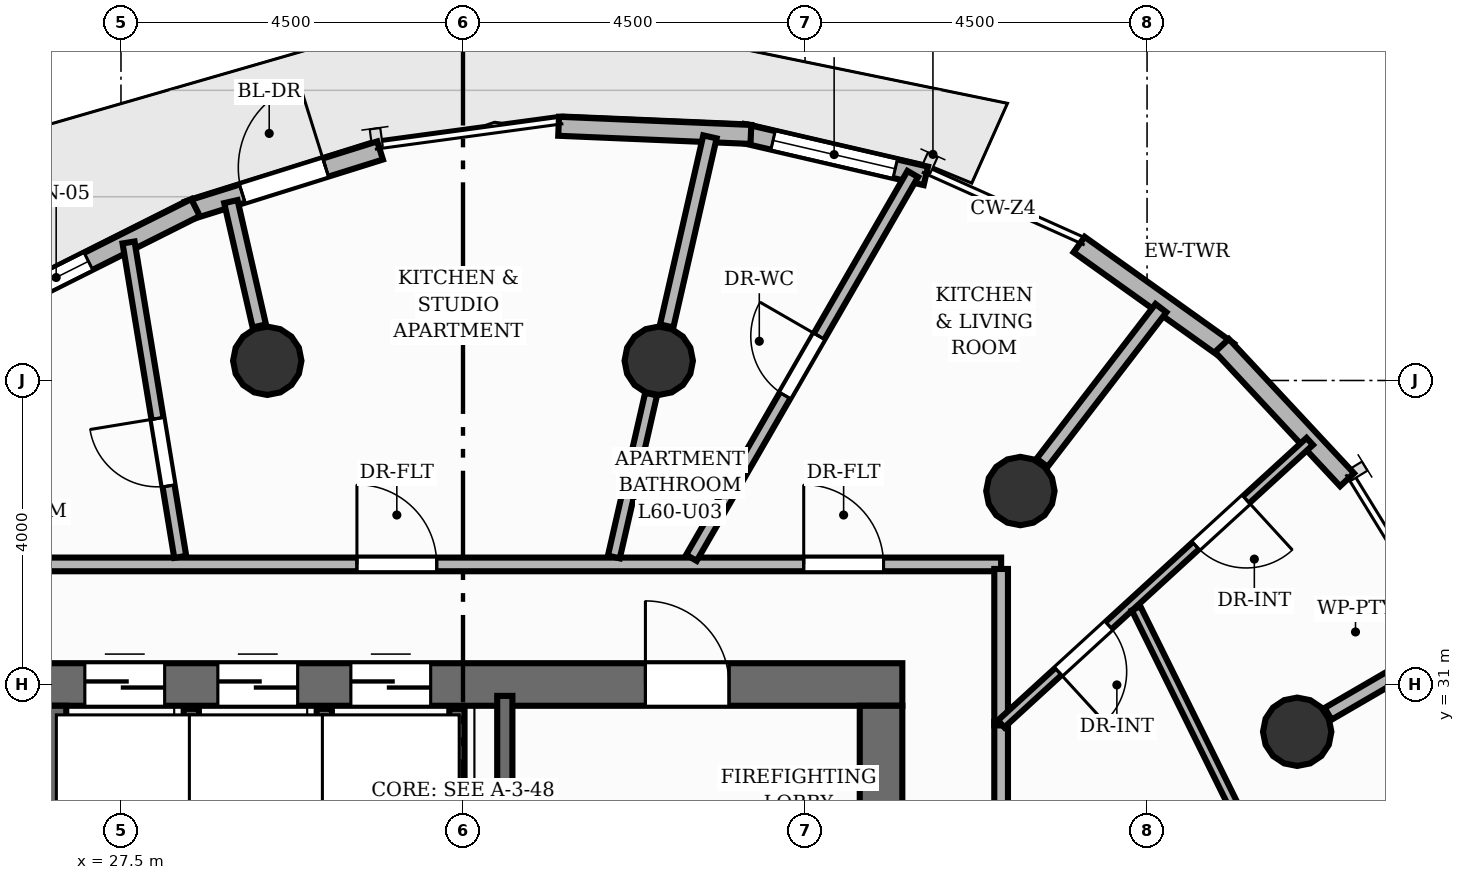
"""IFC4 building model, lengths in metres.
Left out: names, types, materials, properties, quantities, classifications, styles, units other than length and angle.
Written with IfcOpenShell. Run it as: python <this file> out.ifc"""

import sys

from ifc_helpers import new_model, si_unit, direction, frame, frame_2d, origin, origin_2d, place, context, subcontext, project, spatial, rectangle, circle, extrude, element, fill, save


model = new_model("IFC4")
c1 = context("Model", 3, precision=1e-05, world=origin(), true_north=direction((0.0, 1.0)))
c2 = subcontext(c1, "Body", "Model", "MODEL_VIEW")
j1 = project(units=[si_unit("LENGTHUNIT", "METRE"), si_unit("PLANEANGLEUNIT", "RADIAN")], contexts=[c1])
p1 = place(None, origin())
s1 = spatial("IfcSite", under=j1, at=p1, CompositionType="ELEMENT")
p2 = place(p1, origin())
s2 = spatial("IfcBuilding", under=s1, at=p2, CompositionType="ELEMENT")
p3 = place(p2, frame((0.0, 0.0, 201.44)))
s3 = spatial("IfcBuildingStorey", under=s2, at=p3, CompositionType="ELEMENT", Elevation=201.44)
p4 = place(p3, frame((26.22, 31.0, 0.0), z_axis=(0.0, 0.0, 1.0), x_axis=(1.0, 0.0, 0.0)))
e1 = element("IfcWall", 1, at=p4, inside=s3, PredefinedType="SHEAR", context=c2, shape_type="SweptSolid", body=[
    extrude(rectangle(XDim=11.56, YDim=0.56, at=frame_2d((5.78, 0.0))), origin(), (0.0, 0.0, 1.0), 3.2),
])
p5 = place(p4, frame((8.18, 0.0, 0.0)))
e2 = element("IfcOpeningElement", 2, at=p5, cuts=e1, PredefinedType="OPENING", context=c2, shape_type="SweptSolid", body=[
    extrude(rectangle(XDim=1.1, YDim=2.15, at=frame_2d((0.55, 1.075))), frame((0.0, 0.29, 0.0), z_axis=(0.0, -1.0, 0.0), x_axis=(1.0, 0.0, 0.0)), (0.0, 0.0, 1.0), 0.58),
])
p6 = place(p4, frame((0.805, 0.0, 0.0)))
e3 = element("IfcOpeningElement", 3, at=p6, cuts=e1, PredefinedType="OPENING", context=c2, shape_type="SweptSolid", body=[
    extrude(rectangle(XDim=1.05, YDim=2.15, at=frame_2d((0.525, 1.075))), frame((0.0, 0.29, 0.0), z_axis=(0.0, -1.0, 0.0), x_axis=(1.0, 0.0, 0.0)), (0.0, 0.0, 1.0), 0.58),
])
p7 = place(p4, frame((2.555, 0.0, 0.0)))
e4 = element("IfcOpeningElement", 4, at=p7, cuts=e1, PredefinedType="OPENING", context=c2, shape_type="SweptSolid", body=[
    extrude(rectangle(XDim=1.05, YDim=2.15, at=frame_2d((0.525, 1.075))), frame((0.0, 0.29, 0.0), z_axis=(0.0, -1.0, 0.0), x_axis=(1.0, 0.0, 0.0)), (0.0, 0.0, 1.0), 0.58),
])
p8 = place(p4, frame((4.305, 0.0, 0.0)))
e5 = element("IfcOpeningElement", 5, at=p8, cuts=e1, PredefinedType="OPENING", context=c2, shape_type="SweptSolid", body=[
    extrude(rectangle(XDim=1.05, YDim=2.15, at=frame_2d((0.525, 1.075))), frame((0.0, 0.29, 0.0), z_axis=(0.0, -1.0, 0.0), x_axis=(1.0, 0.0, 0.0)), (0.0, 0.0, 1.0), 0.58),
])
for number, where, z_axis, x_axis in (
    (6, (26.5, 17.28, 0.0), (0.0, 0.0, 1.0), (0.0, 1.0, 0.0)),
    (7, (37.5, 17.28, 0.0), (0.0, 0.0, 1.0), (0.0, 1.0, 0.0)),
):
    element("IfcWall", number, at=place(p3, frame(where, z_axis=z_axis, x_axis=x_axis)), inside=s3, PredefinedType="SHEAR", context=c2, shape_type="SweptSolid", body=[
        extrude(rectangle(XDim=13.44, YDim=0.56, at=frame_2d((6.72, 0.0))), origin(), (0.0, 0.0, 1.0), 3.2),
    ])
for number, where, z_axis, x_axis in (
    (8, (42.975, 30.378, 0.0), (0.0, 0.0, 1.0), (1.0, 0.0, 0.0)),
    (9, (39.333, 33.545, 0.0), (0.0, 0.0, 1.0), (1.0, 0.0, 0.0)),
    (10, (34.575, 35.26, 0.0), (0.0, 0.0, 1.0), (1.0, 0.0, 0.0)),
    (11, (29.425, 35.26, 0.0), (0.0, 0.0, 1.0), (1.0, 0.0, 0.0)),
):
    element("IfcColumn", number, at=place(p3, frame(where, z_axis=z_axis, x_axis=x_axis)), inside=s3, PredefinedType="COLUMN", context=c2, shape_type="SweptSolid", body=[
        extrude(circle(Radius=0.45, at=origin_2d()), origin(), (0.0, 0.0, 1.0), 3.2),
    ])
p9 = place(p3, frame((40.106, 36.788, 0.0), z_axis=(0.0, 0.0, 1.0), x_axis=(0.813794949485, -0.581152114504, 0.0)))
e12 = element("IfcWall", 12, at=p9, inside=s3, PredefinedType="SOLIDWALL", context=c2, shape_type="SweptSolid", body=[
    extrude(rectangle(XDim=2.415, YDim=0.25, at=frame_2d((1.208, 0.0))), origin(), (0.0, 0.0, 1.0), 2.96),
])
p10 = place(p3, frame((35.676, 38.253, 0.0), z_axis=(0.0, 0.0, 1.0), x_axis=(0.974096425092, -0.226133046286, 0.0)))
e13 = element("IfcWall", 13, at=p10, inside=s3, PredefinedType="SOLIDWALL", context=c2, shape_type="SweptSolid", body=[
    extrude(rectangle(XDim=2.478, YDim=0.25, at=frame_2d((1.239, 0.0))), origin(), (0.0, 0.0, 1.0), 2.96),
])
p11 = place(p10, frame((0.414, 0.0, 0.85)))
e14 = element("IfcOpeningElement", 14, at=p11, cuts=e13, PredefinedType="OPENING", context=c2, shape_type="SweptSolid", body=[
    extrude(rectangle(XDim=1.65, YDim=1.55, at=frame_2d((0.825, 0.775))), frame((0.0, 0.135, 0.0), z_axis=(0.0, -1.0, 0.0), x_axis=(1.0, 0.0, 0.0)), (0.0, 0.0, 1.0), 0.27),
])
p12 = place(p3, frame((33.258, 38.345, 0.0), z_axis=(0.0, 0.0, 1.0), x_axis=(0.999099670747, -0.042424614469, 0.0)))
e15 = element("IfcWall", 15, at=p12, inside=s3, PredefinedType="SOLIDWALL", context=c2, shape_type="SweptSolid", body=[
    extrude(rectangle(XDim=2.532, YDim=0.25, at=frame_2d((1.266, 0.0))), origin(), (0.0, 0.0, 1.0), 2.96),
])
p13 = place(p3, frame((28.379, 37.234, 0.0), z_axis=(0.0, 0.0, 1.0), x_axis=(0.954307768746, 0.298825505122, 0.0)))
e16 = element("IfcWall", 16, at=p13, inside=s3, PredefinedType="SOLIDWALL", context=c2, shape_type="SweptSolid", body=[
    extrude(rectangle(XDim=2.651, YDim=0.25, at=frame_2d((1.326, 0.0))), origin(), (0.0, 0.0, 1.0), 2.96),
])
p14 = place(p13, frame((0.751, 0.0, 0.0)))
e17 = element("IfcOpeningElement", 17, at=p14, cuts=e16, PredefinedType="OPENING", context=c2, shape_type="SweptSolid", body=[
    extrude(rectangle(XDim=1.15, YDim=2.2, at=frame_2d((0.575, 1.1))), frame((0.0, 0.135, 0.0), z_axis=(0.0, -1.0, 0.0), x_axis=(1.0, 0.0, 0.0)), (0.0, 0.0, 1.0), 0.27),
])
p15 = place(p3, frame((26.066, 36.063, 0.0), z_axis=(0.0, 0.0, 1.0), x_axis=(0.893757522153, 0.448550433724, 0.0)))
e18 = element("IfcWall", 18, at=p15, inside=s3, PredefinedType="SOLIDWALL", context=c2, shape_type="SweptSolid", body=[
    extrude(rectangle(XDim=2.702, YDim=0.25, at=frame_2d((1.351, 0.0))), origin(), (0.0, 0.0, 1.0), 2.96),
])
p16 = place(p15, frame((0.175, 0.0, 0.85)))
e19 = element("IfcOpeningElement", 19, at=p16, cuts=e18, PredefinedType="OPENING", context=c2, shape_type="SweptSolid", body=[
    extrude(rectangle(XDim=0.95, YDim=1.45, at=frame_2d((0.475, 0.725))), frame((0.0, 0.135, 0.0), z_axis=(0.0, -1.0, 0.0), x_axis=(1.0, 0.0, 0.0)), (0.0, 0.0, 1.0), 0.27),
])
p17 = place(p3, frame((41.985, 35.461, 0.0), z_axis=(0.0, 0.0, 1.0), x_axis=(0.681640731319, -0.731687032417, 0.0)))
e20 = element("IfcWall", 20, at=p17, inside=s3, PredefinedType="SOLIDWALL", context=c2, shape_type="SweptSolid", body=[
    extrude(rectangle(XDim=2.415, YDim=0.25, at=frame_2d((1.208, 0.0))), origin(), (0.0, 0.0, 1.0), 2.96),
])
p18 = place(p3, frame((32.55, 27.35, 0.0), z_axis=(0.0, 0.0, 1.0), x_axis=(0.0, 1.0, 0.0)))
e21 = element("IfcWall", 21, at=p18, inside=s3, PredefinedType="SHEAR", context=c2, shape_type="SweptSolid", body=[
    extrude(rectangle(XDim=3.5, YDim=0.2, at=frame_2d((1.75, 0.0))), origin(), (0.0, 0.0, 1.0), 3.2),
])
for number, where, z_axis, x_axis in (
    (22, (31.92, 29.02, 0.0), (0.0, 0.0, 1.0), (0.0, 1.0, 0.0)),
    (23, (28.425, 29.02, 0.0), (0.0, 0.0, 1.0), (0.0, 1.0, 0.0)),
    (24, (30.175, 29.02, 0.0), (0.0, 0.0, 1.0), (0.0, 1.0, 0.0)),
):
    element("IfcWall", number, at=place(p3, frame(where, z_axis=z_axis, x_axis=x_axis)), inside=s3, PredefinedType="SHEAR", context=c2, shape_type="SweptSolid", body=[
        extrude(rectangle(XDim=1.66, YDim=0.2, at=frame_2d((0.83, 0.0))), origin(), (0.0, 0.0, 1.0), 3.2),
    ])
p19 = place(p3, frame((43.382, 30.614, 0.0), z_axis=(0.0, 0.0, 1.0), x_axis=(0.864618511529, 0.502428929821, 0.0)))
e25 = element("IfcWall", 25, at=p19, inside=s3, PredefinedType="PARTITIONING", context=c2, shape_type="SweptSolid", body=[
    extrude(rectangle(XDim=1.706, YDim=0.18, at=frame_2d((0.853, 0.0))), origin(), (0.0, 0.0, 1.0), 2.404),
])
p20 = place(p3, frame((39.62, 33.918, 0.0), z_axis=(0.0, 0.0, 1.0), x_axis=(0.60921849036, 0.79300241551, 0.0)))
e26 = element("IfcWall", 26, at=p20, inside=s3, PredefinedType="PARTITIONING", context=c2, shape_type="SweptSolid", body=[
    extrude(rectangle(XDim=2.565, YDim=0.18, at=frame_2d((1.283, 0.0))), origin(), (0.0, 0.0, 1.0), 2.404),
])
p21 = place(p3, frame((34.68, 35.718, 0.0), z_axis=(0.0, 0.0, 1.0), x_axis=(0.22299363946, 0.974819899654, 0.0)))
e27 = element("IfcWall", 27, at=p21, inside=s3, PredefinedType="PARTITIONING", context=c2, shape_type="SweptSolid", body=[
    extrude(rectangle(XDim=2.552, YDim=0.18, at=frame_2d((1.276, 0.0))), origin(), (0.0, 0.0, 1.0), 2.404),
])
p22 = place(p3, frame((29.32, 35.718, 0.0), z_axis=(0.0, 0.0, 1.0), x_axis=(-0.222978827263, 0.97482328788, 0.0)))
e28 = element("IfcWall", 28, at=p22, inside=s3, PredefinedType="PARTITIONING", context=c2, shape_type="SweptSolid", body=[
    extrude(rectangle(XDim=1.678, YDim=0.18, at=frame_2d((0.839, 0.0))), origin(), (0.0, 0.0, 1.0), 2.404),
])
p23 = place(p3, frame((39.08, 30.508, 0.0), z_axis=(0.0, 0.0, 1.0), x_axis=(0.0, -1.0, 0.0)))
e29 = element("IfcWall", 29, at=p23, inside=s3, PredefinedType="PARTITIONING", context=c2, shape_type="SweptSolid", body=[
    extrude(rectangle(XDim=15.088, YDim=0.18, at=frame_2d((7.544, 0.0))), origin(), (0.0, 0.0, 1.0), 2.955),
])
p24 = place(p23, frame((7.548, 0.0, 0.0)))
e30 = element("IfcOpeningElement", 30, at=p24, cuts=e29, PredefinedType="OPENING", context=c2, shape_type="SweptSolid", body=[
    extrude(rectangle(XDim=1.05, YDim=2.15, at=frame_2d((0.525, 1.075))), frame((0.0, 0.1, 0.0), z_axis=(0.0, -1.0, 0.0), x_axis=(1.0, 0.0, 0.0)), (0.0, 0.0, 1.0), 0.2),
])
p25 = place(p3, frame((24.92, 32.58, 0.0), z_axis=(0.0, 0.0, 1.0), x_axis=(1.0, 0.0, 0.0)))
e31 = element("IfcWall", 31, at=p25, inside=s3, PredefinedType="PARTITIONING", context=c2, shape_type="SweptSolid", body=[
    extrude(rectangle(XDim=14.16, YDim=0.18, at=frame_2d((7.08, 0.0))), origin(), (0.0, 0.0, 1.0), 2.955),
])
p26 = place(p25, frame((11.563, 0.0, 0.0)))
e32 = element("IfcOpeningElement", 32, at=p26, cuts=e31, PredefinedType="OPENING", context=c2, shape_type="SweptSolid", body=[
    extrude(rectangle(XDim=1.05, YDim=2.15, at=frame_2d((0.525, 1.075))), frame((0.0, 0.1, 0.0), z_axis=(0.0, -1.0, 0.0), x_axis=(1.0, 0.0, 0.0)), (0.0, 0.0, 1.0), 0.2),
])
p27 = place(p25, frame((5.684, 0.0, 0.0)))
e33 = element("IfcOpeningElement", 33, at=p27, cuts=e31, PredefinedType="OPENING", context=c2, shape_type="SweptSolid", body=[
    extrude(rectangle(XDim=1.05, YDim=2.15, at=frame_2d((0.525, 1.075))), frame((0.0, 0.1, 0.0), z_axis=(0.0, -1.0, 0.0), x_axis=(1.0, 0.0, 0.0)), (0.0, 0.0, 1.0), 0.2),
])
p28 = place(p3, frame((39.08, 32.52, 0.0), z_axis=(0.0, 0.0, 1.0), x_axis=(0.0, -1.0, 0.0)))
e34 = element("IfcWall", 34, at=p28, inside=s3, PredefinedType="PARTITIONING", context=c2, shape_type="SweptSolid", body=[
    extrude(rectangle(XDim=2.059, YDim=0.18, at=frame_2d((1.029, 0.0))), origin(), (0.0, 0.0, 1.0), 2.955),
])
p29 = place(p3, frame((35.005, 32.667, 0.0), z_axis=(0.0, 0.0, 1.0), x_axis=(0.499495237235, 0.866316632635, 0.0)))
e35 = element("IfcWall", 35, at=p29, inside=s3, PredefinedType="PLUMBINGWALL", context=c2, shape_type="SweptSolid", body=[
    extrude(rectangle(XDim=5.83, YDim=0.16, at=frame_2d((2.915, 0.0))), origin(), (0.0, 0.0, 1.0), 2.692),
])
p30 = place(p29, frame((2.465, 0.0, 0.0)))
e36 = element("IfcOpeningElement", 36, at=p30, cuts=e35, PredefinedType="OPENING", context=c2, shape_type="SweptSolid", body=[
    extrude(rectangle(XDim=0.9, YDim=2.1, at=frame_2d((0.45, 1.05))), frame((0.0, 0.09, 0.0), z_axis=(0.0, -1.0, 0.0), x_axis=(1.0, 0.0, 0.0)), (0.0, 0.0, 1.0), 0.18),
])
p31 = place(p3, frame((43.14, 34.198, 0.0), z_axis=(0.0, 0.0, 1.0), x_axis=(-0.737575567473, -0.675264601668, 0.0)))
e37 = element("IfcWall", 37, at=p31, inside=s3, PredefinedType="PARTITIONING", context=c2, shape_type="SweptSolid", body=[
    extrude(rectangle(XDim=5.505, YDim=0.125, at=frame_2d((2.752, 0.0))), origin(), (0.0, 0.0, 1.0), 2.955),
])
p32 = place(p31, frame((1.133, 0.0, 0.0)))
e38 = element("IfcOpeningElement", 38, at=p32, cuts=e37, PredefinedType="OPENING", context=c2, shape_type="SweptSolid", body=[
    extrude(rectangle(XDim=0.9, YDim=2.1, at=frame_2d((0.45, 1.05))), frame((0.0, 0.073, 0.0), z_axis=(0.0, -1.0, 0.0), x_axis=(1.0, 0.0, 0.0)), (0.0, 0.0, 1.0), 0.145),
])
p33 = place(p31, frame((3.585, 0.0, 0.0)))
e39 = element("IfcOpeningElement", 39, at=p33, cuts=e37, PredefinedType="OPENING", context=c2, shape_type="SweptSolid", body=[
    extrude(rectangle(XDim=0.9, YDim=2.1, at=frame_2d((0.45, 1.05))), frame((0.0, 0.073, 0.0), z_axis=(0.0, -1.0, 0.0), x_axis=(1.0, 0.0, 0.0)), (0.0, 0.0, 1.0), 0.145),
])
p34 = place(p3, frame((33.985, 32.677, 0.0), z_axis=(0.0, 0.0, 1.0), x_axis=(0.222969522248, 0.974825416241, 0.0)))
e40 = element("IfcWall", 40, at=p34, inside=s3, PredefinedType="PLUMBINGWALL", context=c2, shape_type="SweptSolid", body=[
    extrude(rectangle(XDim=2.199, YDim=0.16, at=frame_2d((1.099, 0.0))), origin(), (0.0, 0.0, 1.0), 2.404),
])
p35 = place(p3, frame((43.767, 26.113, 0.0), z_axis=(0.0, 0.0, 1.0), x_axis=(-0.443135854585, 0.89645446866, 0.0)))
e41 = element("IfcWall", 41, at=p35, inside=s3, PredefinedType="PARTITIONING", context=c2, shape_type="SweptSolid", body=[
    extrude(rectangle(XDim=6.569, YDim=0.125, at=frame_2d((3.285, 0.0))), origin(), (0.0, 0.0, 1.0), 2.488),
])
p36 = place(p3, frame((28.28, 32.679, 0.0), z_axis=(0.0, 0.0, 1.0), x_axis=(-0.162160778545, 0.986764349732, 0.0)))
e42 = element("IfcWall", 42, at=p36, inside=s3, PredefinedType="PLUMBINGWALL", context=c2, shape_type="SweptSolid", body=[
    extrude(rectangle(XDim=4.193, YDim=0.16, at=frame_2d((2.096, 0.0))), origin(), (0.0, 0.0, 1.0), 2.692),
])
p37 = place(p36, frame((0.947, 0.0, 0.0)))
e43 = element("IfcOpeningElement", 43, at=p37, cuts=e42, PredefinedType="OPENING", context=c2, shape_type="SweptSolid", body=[
    extrude(rectangle(XDim=0.9, YDim=2.1, at=frame_2d((0.45, 1.05))), frame((0.0, 0.09, 0.0), z_axis=(0.0, -1.0, 0.0), x_axis=(1.0, 0.0, 0.0)), (0.0, 0.0, 1.0), 0.18),
])
p38 = place(p14, origin())
e44 = element("IfcDoor", 44, at=p38, inside=s3, OperationType="SINGLE_SWING_RIGHT", PredefinedType="DOOR", context=c2, shape_type="SweptSolid", body=[
    extrude(rectangle(XDim=1.15, YDim=2.2, at=frame_2d((0.575, 1.1))), frame((0.0, 0.025, 0.0), z_axis=(0.0, -1.0, 0.0), x_axis=(1.0, 0.0, 0.0)), (0.0, 0.0, 1.0), 0.05),
])
fill(e17, e44)
p39 = place(p11, origin())
e45 = element("IfcWindow", 45, at=p39, inside=s3, PartitioningType="SINGLE_PANEL", PredefinedType="WINDOW", context=c2, shape_type="SweptSolid", body=[
    extrude(rectangle(XDim=1.65, YDim=1.55, at=frame_2d((0.825, 0.775))), frame((0.0, 0.03, 0.0), z_axis=(0.0, -1.0, 0.0), x_axis=(1.0, 0.0, 0.0)), (0.0, 0.0, 1.0), 0.06),
])
fill(e14, e45)
p40 = place(p16, origin())
e46 = element("IfcWindow", 46, at=p40, inside=s3, PartitioningType="SINGLE_PANEL", PredefinedType="WINDOW", context=c2, shape_type="SweptSolid", body=[
    extrude(rectangle(XDim=0.95, YDim=1.45, at=frame_2d((0.475, 0.725))), frame((0.0, 0.03, 0.0), z_axis=(0.0, -1.0, 0.0), x_axis=(1.0, 0.0, 0.0)), (0.0, 0.0, 1.0), 0.06),
])
fill(e19, e46)
p41 = place(p5, origin())
e47 = element("IfcDoor", 47, at=p41, inside=s3, OperationType="SINGLE_SWING_LEFT", PredefinedType="DOOR", context=c2, shape_type="SweptSolid", body=[
    extrude(rectangle(XDim=1.1, YDim=2.15, at=frame_2d((0.55, 1.075))), frame((0.0, 0.025, 0.0), z_axis=(0.0, -1.0, 0.0), x_axis=(1.0, 0.0, 0.0)), (0.0, 0.0, 1.0), 0.05),
])
fill(e2, e47)
p42 = place(p6, origin())
e48 = element("IfcDoor", 48, at=p42, inside=s3, OperationType="DOUBLE_DOOR_SLIDING", PredefinedType="DOOR", context=c2, shape_type="SweptSolid", body=[
    extrude(rectangle(XDim=1.05, YDim=2.15, at=frame_2d((0.525, 1.075))), frame((0.0, 0.025, 0.0), z_axis=(0.0, -1.0, 0.0), x_axis=(1.0, 0.0, 0.0)), (0.0, 0.0, 1.0), 0.05),
])
fill(e3, e48)
p43 = place(p7, origin())
e49 = element("IfcDoor", 49, at=p43, inside=s3, OperationType="DOUBLE_DOOR_SLIDING", PredefinedType="DOOR", context=c2, shape_type="SweptSolid", body=[
    extrude(rectangle(XDim=1.05, YDim=2.15, at=frame_2d((0.525, 1.075))), frame((0.0, 0.025, 0.0), z_axis=(0.0, -1.0, 0.0), x_axis=(1.0, 0.0, 0.0)), (0.0, 0.0, 1.0), 0.05),
])
fill(e4, e49)
p44 = place(p8, origin())
e50 = element("IfcDoor", 50, at=p44, inside=s3, OperationType="DOUBLE_DOOR_SLIDING", PredefinedType="DOOR", context=c2, shape_type="SweptSolid", body=[
    extrude(rectangle(XDim=1.05, YDim=2.15, at=frame_2d((0.525, 1.075))), frame((0.0, 0.025, 0.0), z_axis=(0.0, -1.0, 0.0), x_axis=(1.0, 0.0, 0.0)), (0.0, 0.0, 1.0), 0.05),
])
fill(e5, e50)
p45 = place(p26, origin())
e51 = element("IfcDoor", 51, at=p45, inside=s3, OperationType="SINGLE_SWING_LEFT", PredefinedType="DOOR", context=c2, shape_type="SweptSolid", body=[
    extrude(rectangle(XDim=1.05, YDim=2.15, at=frame_2d((0.525, 1.075))), frame((0.0, 0.025, 0.0), z_axis=(0.0, -1.0, 0.0), x_axis=(1.0, 0.0, 0.0)), (0.0, 0.0, 1.0), 0.05),
])
fill(e32, e51)
p46 = place(p30, origin())
e52 = element("IfcDoor", 52, at=p46, inside=s3, OperationType="SINGLE_SWING_RIGHT", PredefinedType="DOOR", context=c2, shape_type="SweptSolid", body=[
    extrude(rectangle(XDim=0.9, YDim=2.1, at=frame_2d((0.45, 1.05))), frame((0.0, 0.025, 0.0), z_axis=(0.0, -1.0, 0.0), x_axis=(1.0, 0.0, 0.0)), (0.0, 0.0, 1.0), 0.05),
])
fill(e36, e52)
p47 = place(p32, origin())
e53 = element("IfcDoor", 53, at=p47, inside=s3, OperationType="SINGLE_SWING_LEFT", PredefinedType="DOOR", context=c2, shape_type="SweptSolid", body=[
    extrude(rectangle(XDim=0.9, YDim=2.1, at=frame_2d((0.45, 1.05))), frame((0.0, 0.025, 0.0), z_axis=(0.0, -1.0, 0.0), x_axis=(1.0, 0.0, 0.0)), (0.0, 0.0, 1.0), 0.05),
])
fill(e38, e53)
p48 = place(p33, origin())
e54 = element("IfcDoor", 54, at=p48, inside=s3, OperationType="SINGLE_SWING_RIGHT", PredefinedType="DOOR", context=c2, shape_type="SweptSolid", body=[
    extrude(rectangle(XDim=0.9, YDim=2.1, at=frame_2d((0.45, 1.05))), frame((0.0, 0.025, 0.0), z_axis=(0.0, -1.0, 0.0), x_axis=(1.0, 0.0, 0.0)), (0.0, 0.0, 1.0), 0.05),
])
fill(e39, e54)
p49 = place(p27, origin())
e55 = element("IfcDoor", 55, at=p49, inside=s3, OperationType="SINGLE_SWING_LEFT", PredefinedType="DOOR", context=c2, shape_type="SweptSolid", body=[
    extrude(rectangle(XDim=1.05, YDim=2.15, at=frame_2d((0.525, 1.075))), frame((0.0, 0.025, 0.0), z_axis=(0.0, -1.0, 0.0), x_axis=(1.0, 0.0, 0.0)), (0.0, 0.0, 1.0), 0.05),
])
fill(e33, e55)
p50 = place(p37, origin())
e56 = element("IfcDoor", 56, at=p50, inside=s3, OperationType="SINGLE_SWING_RIGHT", PredefinedType="DOOR", context=c2, shape_type="SweptSolid", body=[
    extrude(rectangle(XDim=0.9, YDim=2.1, at=frame_2d((0.45, 1.05))), frame((0.0, 0.025, 0.0), z_axis=(0.0, -1.0, 0.0), x_axis=(1.0, 0.0, 0.0)), (0.0, 0.0, 1.0), 0.05),
])
fill(e43, e56)
save(model, sys.argv[1])
